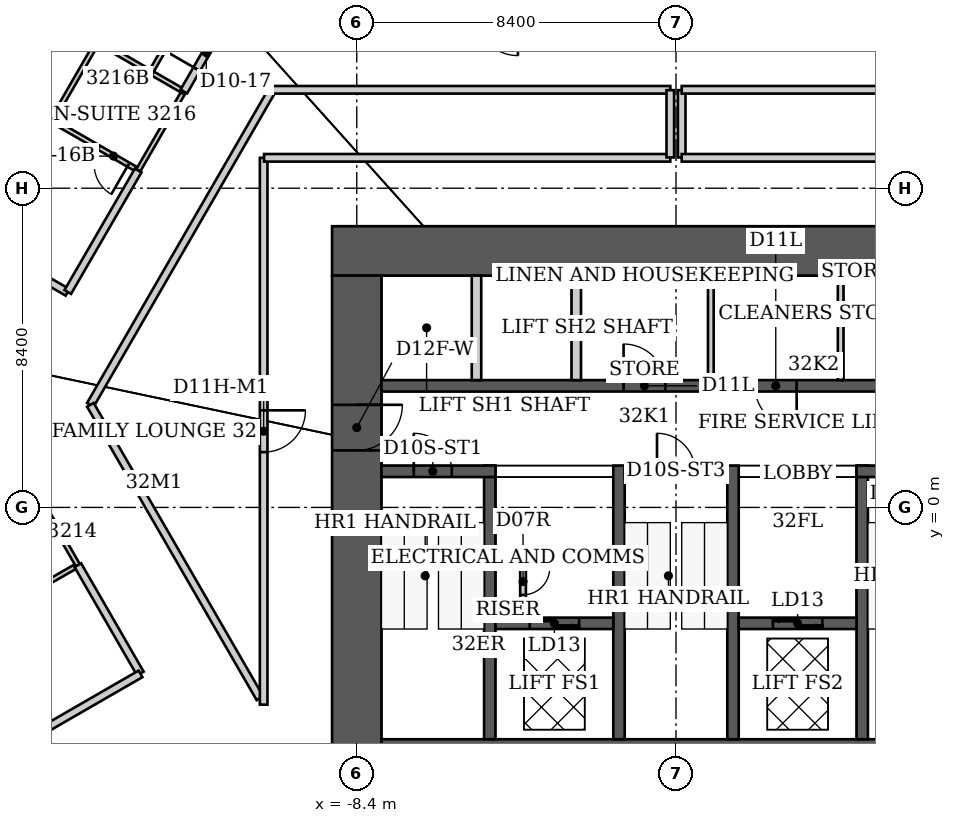
"""IFC4 building model, lengths in metres.
Left out: names, types, materials, properties, quantities, classifications, styles, units other than length and angle.
Written with IfcOpenShell. Run it as: python <this file> out.ifc"""

import sys

from ifc_helpers import new_model, si_unit, direction, frame, frame_2d, origin, place, context, subcontext, project, spatial, rectangle, extrude, element, fill, save


model = new_model("IFC4")
c1 = context("Model", 3, precision=1e-05, world=origin(), true_north=direction((0.0, 1.0)))
c2 = subcontext(c1, "Body", "Model", "MODEL_VIEW")
j1 = project(units=[si_unit("LENGTHUNIT", "METRE"), si_unit("PLANEANGLEUNIT", "RADIAN")], contexts=[c1])
p1 = place(None, origin())
s1 = spatial("IfcSite", under=j1, at=p1, CompositionType="ELEMENT")
p2 = place(p1, origin())
s2 = spatial("IfcBuilding", under=s1, at=p2, CompositionType="ELEMENT")
p3 = place(p2, frame((0.0, 0.0, 131.0)))
s3 = spatial("IfcBuildingStorey", under=s2, at=p3, CompositionType="ELEMENT", Elevation=131.0)
p4 = place(p3, frame((-9.05, 6.75, 0.0), z_axis=(0.0, 0.0, 1.0), x_axis=(1.0, 0.0, 0.0)))
e1 = element("IfcWall", 1, at=p4, inside=s3, PredefinedType="SHEAR", context=c2, shape_type="SweptSolid", body=[
    extrude(rectangle(XDim=18.1, YDim=1.3, at=frame_2d((9.05, 0.0))), origin(), (0.0, 0.0, 1.0), 3.8),
])
p5 = place(p3, frame((-8.4, -9.2, 0.0), z_axis=(0.0, 0.0, 1.0), x_axis=(0.0, 1.0, 0.0)))
e2 = element("IfcWall", 2, at=p5, inside=s3, PredefinedType="SHEAR", context=c2, shape_type="SweptSolid", body=[
    extrude(rectangle(XDim=15.3, YDim=1.3, at=frame_2d((7.65, 0.0))), origin(), (0.0, 0.0, 1.0), 3.8),
])
p6 = place(p5, frame((10.7, 0.0, 0.0)))
e3 = element("IfcOpeningElement", 3, at=p6, cuts=e2, PredefinedType="OPENING", context=c2, shape_type="SweptSolid", body=[
    extrude(rectangle(XDim=1.2, YDim=2.2, at=frame_2d((0.6, 1.1))), frame((0.0, 0.65, 0.0), z_axis=(0.0, -1.0, 0.0), x_axis=(1.0, 0.0, 0.0)), (0.0, 0.0, 1.0), 1.3),
])
p7 = place(p3, frame((-7.75, -6.5, 0.0), z_axis=(0.0, 0.0, 1.0), x_axis=(1.0, 0.0, 0.0)))
e4 = element("IfcWall", 4, at=p7, inside=s3, PredefinedType="SHEAR", context=c2, shape_type="SweptSolid", body=[
    extrude(rectangle(XDim=15.5, YDim=0.8, at=frame_2d((7.75, 0.0))), origin(), (0.0, 0.0, 1.0), 3.8),
])
for number, where, z_axis, x_axis in (
    (5, (-4.9, -6.1, 0.0), (0.0, 0.0, 1.0), (0.0, 1.0, 0.0)),
    (6, (-1.5, -6.1, 0.0), (0.0, 0.0, 1.0), (0.0, 1.0, 0.0)),
    (7, (1.5, -6.1, 0.0), (0.0, 0.0, 1.0), (0.0, 1.0, 0.0)),
    (8, (4.9, -6.1, 0.0), (0.0, 0.0, 1.0), (0.0, 1.0, 0.0)),
):
    element("IfcWall", number, at=place(p3, frame(where, z_axis=z_axis, x_axis=x_axis)), inside=s3, PredefinedType="SHEAR", context=c2, shape_type="SweptSolid", body=[
        extrude(rectangle(XDim=7.2, YDim=0.3, at=frame_2d((3.6, 0.0))), origin(), (0.0, 0.0, 1.0), 3.8),
    ])
p8 = place(p3, frame((-7.75, 0.95, 0.0), z_axis=(0.0, 0.0, 1.0), x_axis=(1.0, 0.0, 0.0)))
e9 = element("IfcWall", 9, at=p8, inside=s3, PredefinedType="SHEAR", context=c2, shape_type="SweptSolid", body=[
    extrude(rectangle(XDim=3.0, YDim=0.3, at=frame_2d((1.5, 0.0))), origin(), (0.0, 0.0, 1.0), 3.8),
])
p9 = place(p8, frame((0.85, 0.0, 0.0)))
e10 = element("IfcOpeningElement", 10, at=p9, cuts=e9, PredefinedType="OPENING", context=c2, shape_type="SweptSolid", body=[
    extrude(rectangle(XDim=1.0, YDim=2.2, at=frame_2d((0.5, 1.1))), frame((0.0, 0.15, 0.0), z_axis=(0.0, -1.0, 0.0), x_axis=(1.0, 0.0, 0.0)), (0.0, 0.0, 1.0), 0.3),
])
p10 = place(p3, frame((-1.35, 0.95, 0.0), z_axis=(0.0, 0.0, 1.0), x_axis=(1.0, 0.0, 0.0)))
e11 = element("IfcWall", 11, at=p10, inside=s3, PredefinedType="SHEAR", context=c2, shape_type="SweptSolid", body=[
    extrude(rectangle(XDim=2.7, YDim=0.3, at=frame_2d((1.35, 0.0))), origin(), (0.0, 0.0, 1.0), 3.8),
])
p11 = place(p10, frame((0.85, 0.0, 0.0)))
e12 = element("IfcOpeningElement", 12, at=p11, cuts=e11, PredefinedType="OPENING", context=c2, shape_type="SweptSolid", body=[
    extrude(rectangle(XDim=1.0, YDim=2.2, at=frame_2d((0.5, 1.1))), frame((0.0, 0.15, 0.0), z_axis=(0.0, -1.0, 0.0), x_axis=(1.0, 0.0, 0.0)), (0.0, 0.0, 1.0), 0.3),
])
p12 = place(p3, frame((4.75, 0.95, 0.0), z_axis=(0.0, 0.0, 1.0), x_axis=(1.0, 0.0, 0.0)))
e13 = element("IfcWall", 13, at=p12, inside=s3, PredefinedType="SHEAR", context=c2, shape_type="SweptSolid", body=[
    extrude(rectangle(XDim=3.0, YDim=0.3, at=frame_2d((1.5, 0.0))), origin(), (0.0, 0.0, 1.0), 3.8),
])
p13 = place(p12, frame((1.15, 0.0, 0.0)))
e14 = element("IfcOpeningElement", 14, at=p13, cuts=e13, PredefinedType="OPENING", context=c2, shape_type="SweptSolid", body=[
    extrude(rectangle(XDim=1.0, YDim=2.2, at=frame_2d((0.5, 1.1))), frame((0.0, 0.15, 0.0), z_axis=(0.0, -1.0, 0.0), x_axis=(1.0, 0.0, 0.0)), (0.0, 0.0, 1.0), 0.3),
])
p14 = place(p3, frame((-4.75, -3.05, 0.0), z_axis=(0.0, 0.0, 1.0), x_axis=(1.0, 0.0, 0.0)))
e15 = element("IfcWall", 15, at=p14, inside=s3, PredefinedType="SHEAR", context=c2, shape_type="SweptSolid", body=[
    extrude(rectangle(XDim=3.1, YDim=0.3, at=frame_2d((1.55, 0.0))), origin(), (0.0, 0.0, 1.0), 3.8),
])
p15 = place(p14, frame((0.9, 0.0, 0.0)))
e16 = element("IfcOpeningElement", 16, at=p15, cuts=e15, PredefinedType="OPENING", context=c2, shape_type="SweptSolid", body=[
    extrude(rectangle(XDim=1.3, YDim=2.1, at=frame_2d((0.65, 1.05))), frame((0.0, 0.15, 0.0), z_axis=(0.0, -1.0, 0.0), x_axis=(1.0, 0.0, 0.0)), (0.0, 0.0, 1.0), 0.3),
])
p16 = place(p3, frame((1.65, -3.05, 0.0), z_axis=(0.0, 0.0, 1.0), x_axis=(1.0, 0.0, 0.0)))
e17 = element("IfcWall", 17, at=p16, inside=s3, PredefinedType="SHEAR", context=c2, shape_type="SweptSolid", body=[
    extrude(rectangle(XDim=3.1, YDim=0.3, at=frame_2d((1.55, 0.0))), origin(), (0.0, 0.0, 1.0), 3.8),
])
p17 = place(p16, frame((0.9, 0.0, 0.0)))
e18 = element("IfcOpeningElement", 18, at=p17, cuts=e17, PredefinedType="OPENING", context=c2, shape_type="SweptSolid", body=[
    extrude(rectangle(XDim=1.3, YDim=2.1, at=frame_2d((0.65, 1.05))), frame((0.0, 0.15, 0.0), z_axis=(0.0, -1.0, 0.0), x_axis=(1.0, 0.0, 0.0)), (0.0, 0.0, 1.0), 0.3),
])
p18 = place(p3, frame((-7.75, 3.2, 0.0), z_axis=(0.0, 0.0, 1.0), x_axis=(1.0, 0.0, 0.0)))
e19 = element("IfcWall", 19, at=p18, inside=s3, PredefinedType="SHEAR", context=c2, shape_type="SweptSolid", body=[
    extrude(rectangle(XDim=15.5, YDim=0.3, at=frame_2d((7.75, 0.0))), origin(), (0.0, 0.0, 1.0), 3.8),
])
p19 = place(p18, frame((6.371, 0.0, 0.0)))
e20 = element("IfcOpeningElement", 20, at=p19, cuts=e19, PredefinedType="OPENING", context=c2, shape_type="SweptSolid", body=[
    extrude(rectangle(XDim=1.1, YDim=2.2, at=frame_2d((0.55, 1.1))), frame((0.0, 0.15, 0.0), z_axis=(0.0, -1.0, 0.0), x_axis=(1.0, 0.0, 0.0)), (0.0, 0.0, 1.0), 0.3),
])
p20 = place(p18, frame((9.825, 0.0, 0.0)))
e21 = element("IfcOpeningElement", 21, at=p20, cuts=e19, PredefinedType="OPENING", context=c2, shape_type="SweptSolid", body=[
    extrude(rectangle(XDim=1.1, YDim=2.2, at=frame_2d((0.55, 1.1))), frame((0.0, 0.15, 0.0), z_axis=(0.0, -1.0, 0.0), x_axis=(1.0, 0.0, 0.0)), (0.0, 0.0, 1.0), 0.3),
])
p21 = place(p18, frame((13.279, 0.0, 0.0)))
e22 = element("IfcOpeningElement", 22, at=p21, cuts=e19, PredefinedType="OPENING", context=c2, shape_type="SweptSolid", body=[
    extrude(rectangle(XDim=1.1, YDim=2.2, at=frame_2d((0.55, 1.1))), frame((0.0, 0.15, 0.0), z_axis=(0.0, -1.0, 0.0), x_axis=(1.0, 0.0, 0.0)), (0.0, 0.0, 1.0), 0.3),
])
for number, where, z_axis, x_axis in (
    (23, (-5.25, 3.35, 0.0), (0.0, 0.0, 1.0), (0.0, 1.0, 0.0)),
    (24, (-2.625, 3.35, 0.0), (0.0, 0.0, 1.0), (0.0, 1.0, 0.0)),
):
    element("IfcWall", number, at=place(p3, frame(where, z_axis=z_axis, x_axis=x_axis)), inside=s3, PredefinedType="PARTITIONING", context=c2, shape_type="SweptSolid", body=[
        extrude(rectangle(XDim=2.75, YDim=0.25, at=frame_2d((1.375, 0.0))), origin(), (0.0, 0.0, 1.0), 3.8),
    ])
p22 = place(p3, frame((-17.67, -2.63, 0.0), z_axis=(0.0, 0.0, 1.0), x_axis=(0.86687668408, 0.498522631983, 0.0)))
e25 = element("IfcWall", 25, at=p22, inside=s3, PredefinedType="PARTITIONING", context=c2, shape_type="SweptSolid", body=[
    extrude(rectangle(XDim=2.226, YDim=0.12, at=frame_2d((1.113, 0.0))), origin(), (0.0, 0.0, 1.0), 3.64),
])
p23 = place(p3, frame((-16.94, 0.56, 0.0), z_axis=(0.0, 0.0, 1.0), x_axis=(0.499693115345, -0.866202511239, 0.0)))
e26 = element("IfcWall", 26, at=p23, inside=s3, PredefinedType="PARTITIONING", context=c2, shape_type="SweptSolid", body=[
    extrude(rectangle(XDim=2.401, YDim=0.12, at=frame_2d((1.201, 0.0))), origin(), (0.0, 0.0, 1.0), 3.64),
])
p24 = place(p3, frame((-16.42, 10.18, 0.0), z_axis=(0.0, 0.0, 1.0), x_axis=(0.866114241029, -0.499846097802, 0.0)))
e27 = element("IfcWall", 27, at=p24, inside=s3, PredefinedType="PARTITIONING", context=c2, shape_type="SweptSolid", body=[
    extrude(rectangle(XDim=2.621, YDim=0.12, at=frame_2d((1.311, 0.0))), origin(), (0.0, 0.0, 1.0), 3.64),
])
p25 = place(p24, frame((1.421, 0.0, 0.0)))
e28 = element("IfcOpeningElement", 28, at=p25, cuts=e27, PredefinedType="OPENING", context=c2, shape_type="SweptSolid", body=[
    extrude(rectangle(XDim=0.9, YDim=2.03, at=frame_2d((0.45, 1.015))), frame((0.0, 0.06, 0.0), z_axis=(0.0, -1.0, 0.0), x_axis=(1.0, 0.0, 0.0)), (0.0, 0.0, 1.0), 0.12),
])
p26 = place(p3, frame((-16.01, 5.66, 0.0), z_axis=(0.0, 0.0, 1.0), x_axis=(-0.866289075554, 0.499543028754, 0.0)))
e29 = element("IfcWall", 29, at=p26, inside=s3, PredefinedType="PARTITIONING", context=c2, shape_type="SweptSolid", body=[
    extrude(rectangle(XDim=9.188, YDim=0.2, at=frame_2d((4.594, 0.0))), origin(), (0.0, 0.0, 1.0), 3.64),
])
p27 = place(p26, frame((4.094, 0.0, 0.0)))
e30 = element("IfcOpeningElement", 30, at=p27, cuts=e29, PredefinedType="OPENING", context=c2, shape_type="SweptSolid", body=[
    extrude(rectangle(XDim=1.0, YDim=2.13, at=frame_2d((0.5, 1.065))), frame((0.0, 0.1, 0.0), z_axis=(0.0, -1.0, 0.0), x_axis=(1.0, 0.0, 0.0)), (0.0, 0.0, 1.0), 0.2),
])
p28 = place(p3, frame((-16.005, 5.669, 0.0), z_axis=(0.0, 0.0, 1.0), x_axis=(0.501374384923, 0.865230446842, 0.0)))
e31 = element("IfcWall", 31, at=p28, inside=s3, PredefinedType="PARTITIONING", context=c2, shape_type="SweptSolid", body=[
    extrude(rectangle(XDim=3.7, YDim=0.2, at=frame_2d((1.85, 0.0))), origin(), (0.0, 0.0, 1.0), 3.64),
])
p29 = place(p3, frame((-15.74, -1.52, 0.0), z_axis=(0.0, 0.0, 1.0), x_axis=(0.499728874041, -0.866181881853, 0.0)))
e32 = element("IfcWall", 32, at=p29, inside=s3, PredefinedType="PARTITIONING", context=c2, shape_type="SweptSolid", body=[
    extrude(rectangle(XDim=3.292, YDim=0.2, at=frame_2d((1.646, 0.0))), origin(), (0.0, 0.0, 1.0), 3.64),
])
p30 = place(p3, frame((-15.41, 2.7, 0.0), z_axis=(0.0, 0.0, 1.0), x_axis=(0.500296290322, 0.865854272894, 0.0)))
e33 = element("IfcWall", 33, at=p30, inside=s3, PredefinedType="PARTITIONING", context=c2, shape_type="SweptSolid", body=[
    extrude(rectangle(XDim=9.574, YDim=0.2, at=frame_2d((4.787, 0.0))), origin(), (0.0, 0.0, 1.0), 3.64),
])
p31 = place(p3, frame((-15.22, 12.26, 0.0), z_axis=(0.0, 0.0, 1.0), x_axis=(-0.499693115345, -0.866202511239, 0.0)))
e34 = element("IfcWall", 34, at=p31, inside=s3, PredefinedType="PARTITIONING", context=c2, shape_type="SweptSolid", body=[
    extrude(rectangle(XDim=2.401, YDim=0.12, at=frame_2d((1.201, 0.0))), origin(), (0.0, 0.0, 1.0), 3.64),
])
p32 = place(p3, frame((-15.22, 12.26, 0.0), z_axis=(0.0, 0.0, 1.0), x_axis=(0.864822777425, -0.502077248685, 0.0)))
e35 = element("IfcWall", 35, at=p32, inside=s3, PredefinedType="PARTITIONING", context=c2, shape_type="SweptSolid", body=[
    extrude(rectangle(XDim=1.617, YDim=0.12, at=frame_2d((0.809, 0.0))), origin(), (0.0, 0.0, 1.0), 3.64),
])
p33 = place(p3, frame((-14.15, 8.87, 0.0), z_axis=(0.0, 0.0, 1.0), x_axis=(0.500401517907, 0.865793463175, 0.0)))
e36 = element("IfcWall", 36, at=p33, inside=s3, PredefinedType="PARTITIONING", context=c2, shape_type="SweptSolid", body=[
    extrude(rectangle(XDim=2.396, YDim=0.12, at=frame_2d((1.198, 0.0))), origin(), (0.0, 0.0, 1.0), 3.64),
])
p34 = place(p3, frame((-14.09, -4.38, 0.0), z_axis=(0.0, 0.0, 1.0), x_axis=(-0.866174008169, -0.499742521277, 0.0)))
e37 = element("IfcWall", 37, at=p34, inside=s3, PredefinedType="PARTITIONING", context=c2, shape_type="SweptSolid", body=[
    extrude(rectangle(XDim=8.074, YDim=0.2, at=frame_2d((4.037, 0.0))), origin(), (0.0, 0.0, 1.0), 3.64),
])
p35 = place(p34, frame((3.537, 0.0, 0.0)))
e38 = element("IfcOpeningElement", 38, at=p35, cuts=e37, PredefinedType="OPENING", context=c2, shape_type="SweptSolid", body=[
    extrude(rectangle(XDim=1.0, YDim=2.13, at=frame_2d((0.5, 1.065))), frame((0.0, 0.1, 0.0), z_axis=(0.0, -1.0, 0.0), x_axis=(1.0, 0.0, 0.0)), (0.0, 0.0, 1.0), 0.2),
])
p36 = place(p3, frame((-13.821, 11.448, 0.0), z_axis=(0.0, 0.0, 1.0), x_axis=(0.865694957185, -0.500571914019, 0.0)))
e39 = element("IfcWall", 39, at=p36, inside=s3, PredefinedType="PARTITIONING", context=c2, shape_type="SweptSolid", body=[
    extrude(rectangle(XDim=0.995, YDim=0.12, at=frame_2d((0.498, 0.0))), origin(), (0.0, 0.0, 1.0), 3.64),
])
p37 = place(p3, frame((-13.82, 11.45, 0.0), z_axis=(0.0, 0.0, 1.0), x_axis=(0.499407914056, 0.866366975004, 0.0)))
e40 = element("IfcWall", 40, at=p37, inside=s3, PredefinedType="PARTITIONING", context=c2, shape_type="SweptSolid", body=[
    extrude(rectangle(XDim=2.643, YDim=0.12, at=frame_2d((1.322, 0.0))), origin(), (0.0, 0.0, 1.0), 3.64),
])
p38 = place(p3, frame((-12.951, 10.945, 0.0), z_axis=(0.0, 0.0, 1.0), x_axis=(0.499996855872, 0.86602721904, 0.0)))
e41 = element("IfcWall", 41, at=p38, inside=s3, PredefinedType="PARTITIONING", context=c2, shape_type="SweptSolid", body=[
    extrude(rectangle(XDim=2.362, YDim=0.2, at=frame_2d((1.181, 0.0))), origin(), (0.0, 0.0, 1.0), 3.64),
])
p39 = place(p38, frame((0.681, 0.0, 0.0)))
e42 = element("IfcOpeningElement", 42, at=p39, cuts=e41, PredefinedType="OPENING", context=c2, shape_type="SweptSolid", body=[
    extrude(rectangle(XDim=1.0, YDim=2.13, at=frame_2d((0.5, 1.065))), frame((0.0, 0.1, 0.0), z_axis=(0.0, -1.0, 0.0), x_axis=(1.0, 0.0, 0.0)), (0.0, 0.0, 1.0), 0.2),
])
p40 = place(p3, frame((-10.948, -5.021, 0.0), z_axis=(0.0, 0.0, 1.0), x_axis=(-0.500384322182, 0.865803401538, 0.0)))
e43 = element("IfcWall", 43, at=p40, inside=s3, PredefinedType="PARTITIONING", context=c2, shape_type="SweptSolid", body=[
    extrude(rectangle(XDim=8.918, YDim=0.2, at=frame_2d((4.459, 0.0))), origin(), (0.0, 0.0, 1.0), 3.64),
])
p41 = place(p3, frame((-10.85, 9.2, 0.0), z_axis=(0.0, 0.0, 1.0), x_axis=(0.0, -1.0, 0.0)))
e44 = element("IfcWall", 44, at=p41, inside=s3, PredefinedType="PARTITIONING", context=c2, shape_type="SweptSolid", body=[
    extrude(rectangle(XDim=14.39, YDim=0.2, at=frame_2d((7.195, 0.0))), origin(), (0.0, 0.0, 1.0), 3.64),
])
p42 = place(p41, frame((6.645, 0.0, 0.0)))
e45 = element("IfcOpeningElement", 45, at=p42, cuts=e44, PredefinedType="OPENING", context=c2, shape_type="SweptSolid", body=[
    extrude(rectangle(XDim=1.1, YDim=2.2, at=frame_2d((0.55, 1.1))), frame((0.0, 0.1, 0.0), z_axis=(0.0, -1.0, 0.0), x_axis=(1.0, 0.0, 0.0)), (0.0, 0.0, 1.0), 0.2),
])
p43 = place(p3, frame((-10.62, 10.99, 0.0), z_axis=(0.0, 0.0, 1.0), x_axis=(1.0, 0.0, 0.0)))
e46 = element("IfcWall", 46, at=p43, inside=s3, PredefinedType="PARTITIONING", context=c2, shape_type="SweptSolid", body=[
    extrude(rectangle(XDim=10.47, YDim=0.2, at=frame_2d((5.235, 0.0))), origin(), (0.0, 0.0, 1.0), 3.64),
])
p44 = place(p3, frame((-0.15, 9.2, 0.0), z_axis=(0.0, 0.0, 1.0), x_axis=(-1.0, 0.0, 0.0)))
e47 = element("IfcWall", 47, at=p44, inside=s3, PredefinedType="PARTITIONING", context=c2, shape_type="SweptSolid", body=[
    extrude(rectangle(XDim=10.69, YDim=0.2, at=frame_2d((5.345, 0.0))), origin(), (0.0, 0.0, 1.0), 3.64),
])
for number, where, z_axis, x_axis in (
    (48, (-0.15, 10.98, 0.0), (0.0, 0.0, 1.0), (0.0, -1.0, 0.0)),
    (49, (0.15, 9.21, 0.0), (0.0, 0.0, 1.0), (0.0, 1.0, 0.0)),
):
    element("IfcWall", number, at=place(p3, frame(where, z_axis=z_axis, x_axis=x_axis)), inside=s3, PredefinedType="PARTITIONING", context=c2, shape_type="SweptSolid", body=[
        extrude(rectangle(XDim=1.77, YDim=0.2, at=frame_2d((0.885, 0.0))), origin(), (0.0, 0.0, 1.0), 3.64),
    ])
p45 = place(p3, frame((0.15, 10.99, 0.0), z_axis=(0.0, 0.0, 1.0), x_axis=(1.0, 0.0, 0.0)))
e50 = element("IfcWall", 50, at=p45, inside=s3, PredefinedType="PARTITIONING", context=c2, shape_type="SweptSolid", body=[
    extrude(rectangle(XDim=12.78, YDim=0.2, at=frame_2d((6.39, 0.0))), origin(), (0.0, 0.0, 1.0), 3.64),
])
p46 = place(p3, frame((10.84, 9.2, 0.0), z_axis=(0.0, 0.0, 1.0), x_axis=(-1.0, 0.0, 0.0)))
e51 = element("IfcWall", 51, at=p46, inside=s3, PredefinedType="PARTITIONING", context=c2, shape_type="SweptSolid", body=[
    extrude(rectangle(XDim=10.69, YDim=0.2, at=frame_2d((5.345, 0.0))), origin(), (0.0, 0.0, 1.0), 3.64),
])
p47 = place(p3, frame((-4.025, -2.9, 0.0), z_axis=(0.0, 0.0, 1.0), x_axis=(0.0, 1.0, 0.0)))
e52 = element("IfcWall", 52, at=p47, inside=s3, PredefinedType="PARTITIONING", context=c2, shape_type="SweptSolid", body=[
    extrude(rectangle(XDim=1.775, YDim=0.15, at=frame_2d((0.887, 0.0))), origin(), (0.0, 0.0, 1.0), 3.64),
])
p48 = place(p47, frame((0.6, 0.0, 0.0)))
e53 = element("IfcOpeningElement", 53, at=p48, cuts=e52, PredefinedType="OPENING", context=c2, shape_type="SweptSolid", body=[
    extrude(rectangle(XDim=0.7, YDim=2.1, at=frame_2d((0.35, 1.05))), frame((0.0, 0.075, 0.0), z_axis=(0.0, -1.0, 0.0), x_axis=(1.0, 0.0, 0.0)), (0.0, 0.0, 1.0), 0.15),
])
p49 = place(p3, frame((-4.75, -1.2, 0.0), z_axis=(0.0, 0.0, 1.0), x_axis=(1.0, 0.0, 0.0)))
e54 = element("IfcWall", 54, at=p49, inside=s3, PredefinedType="PARTITIONING", context=c2, shape_type="SweptSolid", body=[
    extrude(rectangle(XDim=0.8, YDim=0.15, at=frame_2d((0.4, 0.0))), origin(), (0.0, 0.0, 1.0), 3.64),
])
for number, where, z_axis, x_axis in (
    (55, (0.917, 3.35, 0.0), (0.0, 0.0, 1.0), (0.0, 1.0, 0.0)),
    (56, (4.333, 3.35, 0.0), (0.0, 0.0, 1.0), (0.0, 1.0, 0.0)),
):
    element("IfcWall", number, at=place(p3, frame(where, z_axis=z_axis, x_axis=x_axis)), inside=s3, PredefinedType="PARTITIONING", context=c2, shape_type="SweptSolid", body=[
        extrude(rectangle(XDim=2.75, YDim=0.15, at=frame_2d((1.375, 0.0))), origin(), (0.0, 0.0, 1.0), 3.64),
    ])
p50 = place(p25, origin())
e57 = element("IfcDoor", 57, at=p50, inside=s3, OperationType="SINGLE_SWING_RIGHT", PredefinedType="DOOR", context=c2, shape_type="SweptSolid", body=[
    extrude(rectangle(XDim=0.9, YDim=2.03, at=frame_2d((0.45, 1.015))), frame((0.0, 0.025, 0.0), z_axis=(0.0, -1.0, 0.0), x_axis=(1.0, 0.0, 0.0)), (0.0, 0.0, 1.0), 0.05),
])
fill(e28, e57)
p51 = place(p39, origin())
e58 = element("IfcDoor", 58, at=p51, inside=s3, OperationType="SINGLE_SWING_LEFT", PredefinedType="DOOR", context=c2, shape_type="SweptSolid", body=[
    extrude(rectangle(XDim=1.0, YDim=2.13, at=frame_2d((0.5, 1.065))), frame((0.0, 0.025, 0.0), z_axis=(0.0, -1.0, 0.0), x_axis=(1.0, 0.0, 0.0)), (0.0, 0.0, 1.0), 0.05),
])
fill(e42, e58)
p52 = place(p42, origin())
e59 = element("IfcDoor", 59, at=p52, inside=s3, OperationType="SINGLE_SWING_LEFT", PredefinedType="DOOR", context=c2, shape_type="SweptSolid", body=[
    extrude(rectangle(XDim=1.1, YDim=2.2, at=frame_2d((0.55, 1.1))), frame((0.0, 0.025, 0.0), z_axis=(0.0, -1.0, 0.0), x_axis=(1.0, 0.0, 0.0)), (0.0, 0.0, 1.0), 0.05),
])
fill(e45, e59)
p53 = place(p9, origin())
e60 = element("IfcDoor", 60, at=p53, inside=s3, OperationType="SINGLE_SWING_LEFT", PredefinedType="DOOR", context=c2, shape_type="SweptSolid", body=[
    extrude(rectangle(XDim=1.0, YDim=2.2, at=frame_2d((0.5, 1.1))), frame((0.0, 0.025, 0.0), z_axis=(0.0, -1.0, 0.0), x_axis=(1.0, 0.0, 0.0)), (0.0, 0.0, 1.0), 0.05),
])
fill(e10, e60)
p54 = place(p11, origin())
e61 = element("IfcDoor", 61, at=p54, inside=s3, OperationType="SINGLE_SWING_LEFT", PredefinedType="DOOR", context=c2, shape_type="SweptSolid", body=[
    extrude(rectangle(XDim=1.0, YDim=2.2, at=frame_2d((0.5, 1.1))), frame((0.0, 0.025, 0.0), z_axis=(0.0, -1.0, 0.0), x_axis=(1.0, 0.0, 0.0)), (0.0, 0.0, 1.0), 0.05),
])
fill(e12, e61)
p55 = place(p6, origin())
e62 = element("IfcDoor", 62, at=p55, inside=s3, OperationType="SINGLE_SWING_RIGHT", PredefinedType="DOOR", context=c2, shape_type="SweptSolid", body=[
    extrude(rectangle(XDim=1.2, YDim=2.2, at=frame_2d((0.6, 1.1))), frame((0.0, 0.025, 0.0), z_axis=(0.0, -1.0, 0.0), x_axis=(1.0, 0.0, 0.0)), (0.0, 0.0, 1.0), 0.05),
])
fill(e3, e62)
p56 = place(p48, origin())
e63 = element("IfcDoor", 63, at=p56, inside=s3, OperationType="SINGLE_SWING_RIGHT", PredefinedType="DOOR", context=c2, shape_type="SweptSolid", body=[
    extrude(rectangle(XDim=0.7, YDim=2.1, at=frame_2d((0.35, 1.05))), frame((0.0, 0.025, 0.0), z_axis=(0.0, -1.0, 0.0), x_axis=(1.0, 0.0, 0.0)), (0.0, 0.0, 1.0), 0.05),
])
fill(e53, e63)
p57 = place(p19, origin())
e64 = element("IfcDoor", 64, at=p57, inside=s3, OperationType="SINGLE_SWING_LEFT", PredefinedType="DOOR", context=c2, shape_type="SweptSolid", body=[
    extrude(rectangle(XDim=1.1, YDim=2.2, at=frame_2d((0.55, 1.1))), frame((0.0, 0.025, 0.0), z_axis=(0.0, -1.0, 0.0), x_axis=(1.0, 0.0, 0.0)), (0.0, 0.0, 1.0), 0.05),
])
fill(e20, e64)
p58 = place(p20, origin())
e65 = element("IfcDoor", 65, at=p58, inside=s3, OperationType="SINGLE_SWING_RIGHT", PredefinedType="DOOR", context=c2, shape_type="SweptSolid", body=[
    extrude(rectangle(XDim=1.1, YDim=2.2, at=frame_2d((0.55, 1.1))), frame((0.0, 0.025, 0.0), z_axis=(0.0, -1.0, 0.0), x_axis=(1.0, 0.0, 0.0)), (0.0, 0.0, 1.0), 0.05),
])
fill(e21, e65)
p59 = place(p15, origin())
e66 = element("IfcDoor", 66, at=p59, inside=s3, OperationType="DOUBLE_DOOR_SLIDING", PredefinedType="DOOR", context=c2, shape_type="SweptSolid", body=[
    extrude(rectangle(XDim=1.3, YDim=2.1, at=frame_2d((0.65, 1.05))), frame((0.0, 0.025, 0.0), z_axis=(0.0, -1.0, 0.0), x_axis=(1.0, 0.0, 0.0)), (0.0, 0.0, 1.0), 0.05),
])
fill(e16, e66)
p60 = place(p17, origin())
e67 = element("IfcDoor", 67, at=p60, inside=s3, OperationType="DOUBLE_DOOR_SLIDING", PredefinedType="DOOR", context=c2, shape_type="SweptSolid", body=[
    extrude(rectangle(XDim=1.3, YDim=2.1, at=frame_2d((0.65, 1.05))), frame((0.0, 0.025, 0.0), z_axis=(0.0, -1.0, 0.0), x_axis=(1.0, 0.0, 0.0)), (0.0, 0.0, 1.0), 0.05),
])
fill(e18, e67)
save(model, sys.argv[1])
